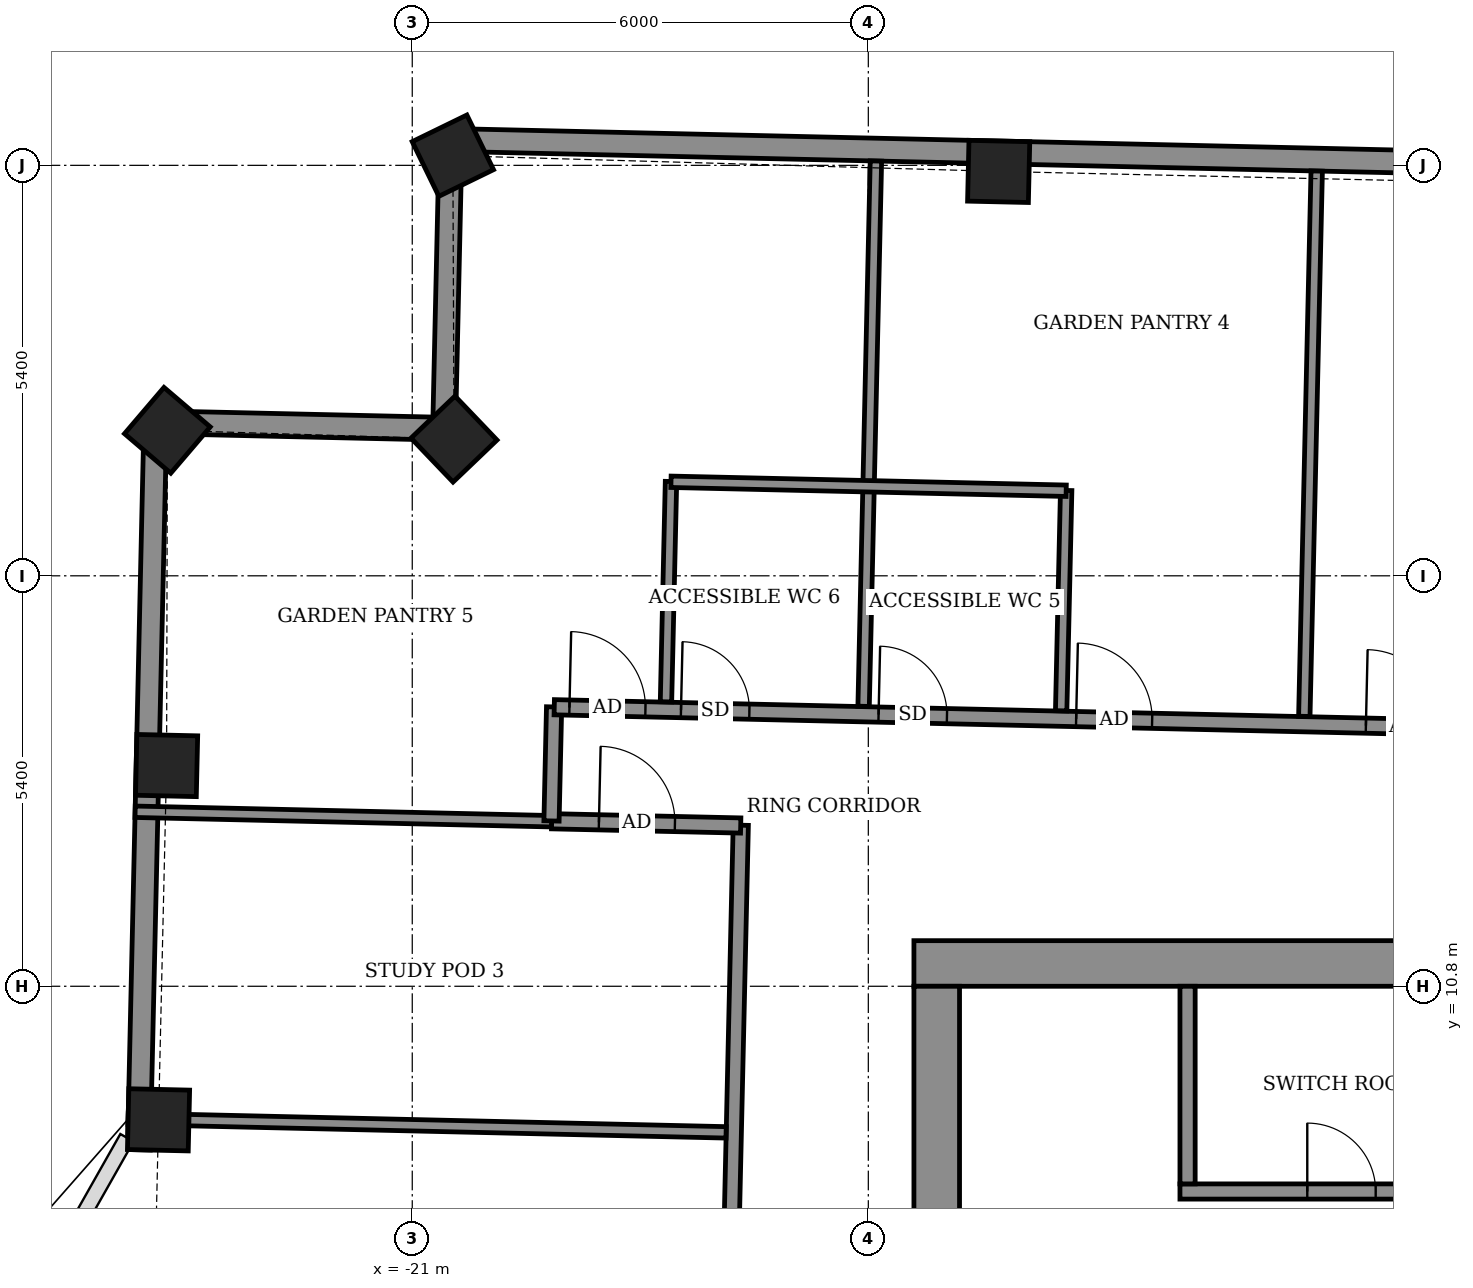
"""IFC4 building model, lengths in metres.
Left out: names, types, materials, properties, quantities, classifications, styles, units other than length and angle.
Written with IfcOpenShell. Run it as: python <this file> out.ifc"""

import sys

from ifc_helpers import new_model, si_unit, direction, frame, frame_2d, origin, origin_2d, place, context, subcontext, project, spatial, rectangle, extrude, element, fill, save


model = new_model("IFC4")
c1 = context("Model", 3, precision=1e-05, world=origin(), true_north=direction((0.0, 1.0)))
c2 = subcontext(c1, "Body", "Model", "MODEL_VIEW")
j1 = project(units=[si_unit("LENGTHUNIT", "METRE"), si_unit("PLANEANGLEUNIT", "RADIAN")], contexts=[c1])
p1 = place(None, origin())
s1 = spatial("IfcSite", under=j1, at=p1, CompositionType="ELEMENT")
p2 = place(p1, origin())
s2 = spatial("IfcBuilding", under=s1, at=p2, CompositionType="ELEMENT")
p3 = place(p2, frame((0.0, 0.0, 342.5)))
s3 = spatial("IfcBuildingStorey", under=s2, at=p3, CompositionType="ELEMENT", Elevation=342.5)
for number, where, z_axis, x_axis in (
    (1, (-13.285, 21.52, -0.55), (0.0, 0.0, 1.0), (-1.0, 0.023, 0.0)),
    (2, (-20.466, 21.728, -0.55), (0.0, 0.0, 1.0), (-0.899, -0.438, 0.0)),
    (3, (-20.451, 17.999, -0.55), (0.0, 0.0, 1.0), (-0.723, -0.691, 0.0)),
    (4, (-24.222, 18.114, -0.55), (0.0, 0.0, 1.0), (-0.649, -0.761, 0.0)),
    (5, (-24.232, 13.704, -0.55), (0.0, 0.0, 1.0), (-0.023, -1.0, 0.0)),
    (6, (-24.338, 9.043, -0.55), (0.0, 0.0, 1.0), (-0.023, -1.0, 0.0)),
):
    element("IfcColumn", number, at=place(p3, frame(where, z_axis=z_axis, x_axis=x_axis)), inside=s3, PredefinedType="COLUMN", context=c2, shape_type="SweptSolid", body=[
        extrude(rectangle(XDim=0.8, YDim=0.8, at=origin_2d()), origin(), (0.0, 0.0, 1.0), 3.6),
    ])
p4 = place(p3, frame((23.394, 20.938, 0.0), z_axis=(0.0, 0.0, 1.0), x_axis=(-0.99974255281, 0.02268982375, 0.0)))
e7 = element("IfcWall", 7, at=p4, inside=s3, PredefinedType="SOLIDWALL", context=c2, shape_type="SweptSolid", body=[
    extrude(rectangle(XDim=43.9, YDim=0.3, at=frame_2d((21.95, 0.0))), origin(), (0.0, 0.0, 1.0), 2.5),
])
p5 = place(p3, frame((-20.495, 21.934, 0.0), z_axis=(0.0, 0.0, 1.0), x_axis=(-0.022614868993, -0.999744251146, 0.0)))
e8 = element("IfcWall", 8, at=p5, inside=s3, PredefinedType="SOLIDWALL", context=c2, shape_type="SweptSolid", body=[
    extrude(rectangle(XDim=3.8, YDim=0.3, at=frame_2d((1.9, 0.0))), origin(), (0.0, 0.0, 1.0), 2.55),
])
p6 = place(p3, frame((-20.581, 18.135, 0.0), z_axis=(0.0, 0.0, 1.0), x_axis=(-0.999744218285, 0.022616321648, 0.0)))
e9 = element("IfcWall", 9, at=p6, inside=s3, PredefinedType="SOLIDWALL", context=c2, shape_type="SweptSolid", body=[
    extrude(rectangle(XDim=3.8, YDim=0.3, at=frame_2d((1.9, 0.0))), origin(), (0.0, 0.0, 1.0), 2.55),
])
p7 = place(p3, frame((-24.38, 18.221, 0.0), z_axis=(0.0, 0.0, 1.0), x_axis=(-0.022668695782, -0.9997430321, 0.0)))
e10 = element("IfcWall", 10, at=p7, inside=s3, PredefinedType="SOLIDWALL", context=c2, shape_type="SweptSolid", body=[
    extrude(rectangle(XDim=9.574, YDim=0.3, at=frame_2d((4.787, 0.0))), origin(), (0.0, 0.0, 1.0), 2.55),
])
p8 = place(p3, frame((-17.247, -12.149, 0.0), z_axis=(0.0, 0.0, 1.0), x_axis=(0.022696191528, 0.999742408268, 0.0)))
e11 = element("IfcWall", 11, at=p8, inside=s3, PredefinedType="PARTITIONING", context=c2, shape_type="SweptSolid", body=[
    extrude(rectangle(XDim=25.074, YDim=0.2, at=frame_2d((12.537, 0.0))), origin(), (0.0, 0.0, 1.0), 3.05),
])
p9 = place(p8, frame((18.022, 0.0, 0.0)))
e12 = element("IfcOpeningElement", 12, at=p9, cuts=e11, PredefinedType="OPENING", context=c2, shape_type="SweptSolid", body=[
    extrude(rectangle(XDim=1.0, YDim=2.1, at=frame_2d((0.5, 1.05))), frame((0.0, 0.11, 0.0), z_axis=(0.0, -1.0, 0.0), x_axis=(1.0, 0.0, 0.0)), (0.0, 0.0, 1.0), 0.22),
])
p10 = place(p8, frame((10.825, 0.0, 0.0)))
e13 = element("IfcOpeningElement", 13, at=p10, cuts=e11, PredefinedType="OPENING", context=c2, shape_type="SweptSolid", body=[
    extrude(rectangle(XDim=1.0, YDim=2.1, at=frame_2d((0.5, 1.05))), frame((0.0, 0.11, 0.0), z_axis=(0.0, -1.0, 0.0), x_axis=(1.0, 0.0, 0.0)), (0.0, 0.0, 1.0), 0.22),
])
p11 = place(p8, frame((6.075, 0.0, 0.0)))
e14 = element("IfcOpeningElement", 14, at=p11, cuts=e11, PredefinedType="OPENING", context=c2, shape_type="SweptSolid", body=[
    extrude(rectangle(XDim=1.0, YDim=2.1, at=frame_2d((0.5, 1.05))), frame((0.0, 0.11, 0.0), z_axis=(0.0, -1.0, 0.0), x_axis=(1.0, 0.0, 0.0)), (0.0, 0.0, 1.0), 0.22),
])
p12 = place(p8, frame((1.3, 0.0, 0.0)))
e15 = element("IfcOpeningElement", 15, at=p12, cuts=e11, PredefinedType="OPENING", context=c2, shape_type="SweptSolid", body=[
    extrude(rectangle(XDim=0.9, YDim=2.1, at=frame_2d((0.45, 1.05))), frame((0.0, 0.11, 0.0), z_axis=(0.0, -1.0, 0.0), x_axis=(1.0, 0.0, 0.0)), (0.0, 0.0, 1.0), 0.22),
])
p13 = place(p3, frame((-24.738, 9.057, 0.0), z_axis=(0.0, 0.0, 1.0), x_axis=(0.999741370831, -0.022741843553, 0.0)))
e16 = element("IfcWall", 16, at=p13, inside=s3, PredefinedType="PARTITIONING", context=c2, shape_type="SweptSolid", body=[
    extrude(rectangle(XDim=7.869, YDim=0.15, at=frame_2d((3.935, 0.0))), origin(), (0.0, 0.0, 1.0), 3.05),
])
p14 = place(p3, frame((-24.646, 13.096, 0.0), z_axis=(0.0, 0.0, 1.0), x_axis=(0.999740316781, -0.022788132944, 0.0)))
e17 = element("IfcWall", 17, at=p14, inside=s3, PredefinedType="PARTITIONING", context=c2, shape_type="SweptSolid", body=[
    extrude(rectangle(XDim=5.485, YDim=0.15, at=frame_2d((2.743, 0.0))), origin(), (0.0, 0.0, 1.0), 2.55),
])
p15 = place(p3, frame((-19.166, 12.971, 0.0), z_axis=(0.0, 0.0, 1.0), x_axis=(0.999747428818, -0.022473953195, 0.0)))
e18 = element("IfcWall", 18, at=p15, inside=s3, PredefinedType="PARTITIONING", context=c2, shape_type="SweptSolid", body=[
    extrude(rectangle(XDim=2.488, YDim=0.2, at=frame_2d((1.244, 0.0))), origin(), (0.0, 0.0, 1.0), 3.05),
])
p16 = place(p15, frame((0.622, 0.0, 0.0)))
e19 = element("IfcOpeningElement", 19, at=p16, cuts=e18, PredefinedType="OPENING", context=c2, shape_type="SweptSolid", body=[
    extrude(rectangle(XDim=1.0, YDim=2.1, at=frame_2d((0.5, 1.05))), frame((0.0, 0.11, 0.0), z_axis=(0.0, -1.0, 0.0), x_axis=(1.0, 0.0, 0.0)), (0.0, 0.0, 1.0), 0.22),
])
p17 = place(p3, frame((-19.168, 12.975, 0.0), z_axis=(0.0, 0.0, 1.0), x_axis=(0.022617910375, 0.999744182344, 0.0)))
e20 = element("IfcWall", 20, at=p17, inside=s3, PredefinedType="PARTITIONING", context=c2, shape_type="SweptSolid", body=[
    extrude(rectangle(XDim=1.5, YDim=0.2, at=frame_2d((0.75, 0.0))), origin(), (0.0, 0.0, 1.0), 3.05),
])
p18 = place(p3, frame((-19.132, 14.471, 0.0), z_axis=(0.0, 0.0, 1.0), x_axis=(0.999742846934, -0.022676860534, 0.0)))
e21 = element("IfcWall", 21, at=p18, inside=s3, PredefinedType="PARTITIONING", context=c2, shape_type="SweptSolid", body=[
    extrude(rectangle(XDim=40.836, YDim=0.2, at=frame_2d((20.418, 0.0))), origin(), (0.0, 0.0, 1.0), 3.05),
])
p19 = place(p18, frame((38.379, 0.0, 0.0)))
e22 = element("IfcOpeningElement", 22, at=p19, cuts=e21, PredefinedType="OPENING", context=c2, shape_type="SweptSolid", body=[
    extrude(rectangle(XDim=1.0, YDim=2.1, at=frame_2d((0.5, 1.05))), frame((0.0, 0.11, 0.0), z_axis=(0.0, -1.0, 0.0), x_axis=(1.0, 0.0, 0.0)), (0.0, 0.0, 1.0), 0.22),
])
p20 = place(p18, frame((35.768, 0.0, 0.0)))
e23 = element("IfcOpeningElement", 23, at=p20, cuts=e21, PredefinedType="OPENING", context=c2, shape_type="SweptSolid", body=[
    extrude(rectangle(XDim=0.9, YDim=2.1, at=frame_2d((0.45, 1.05))), frame((0.0, 0.11, 0.0), z_axis=(0.0, -1.0, 0.0), x_axis=(1.0, 0.0, 0.0)), (0.0, 0.0, 1.0), 0.22),
])
p21 = place(p18, frame((31.451, 0.0, 0.0)))
e24 = element("IfcOpeningElement", 24, at=p21, cuts=e21, PredefinedType="OPENING", context=c2, shape_type="SweptSolid", body=[
    extrude(rectangle(XDim=1.0, YDim=2.1, at=frame_2d((0.5, 1.05))), frame((0.0, 0.11, 0.0), z_axis=(0.0, -1.0, 0.0), x_axis=(1.0, 0.0, 0.0)), (0.0, 0.0, 1.0), 0.22),
])
p22 = place(p18, frame((28.868, 0.0, 0.0)))
e25 = element("IfcOpeningElement", 25, at=p22, cuts=e21, PredefinedType="OPENING", context=c2, shape_type="SweptSolid", body=[
    extrude(rectangle(XDim=0.9, YDim=2.1, at=frame_2d((0.45, 1.05))), frame((0.0, 0.11, 0.0), z_axis=(0.0, -1.0, 0.0), x_axis=(1.0, 0.0, 0.0)), (0.0, 0.0, 1.0), 0.22),
])
p23 = place(p18, frame((24.743, 0.0, 0.0)))
e26 = element("IfcOpeningElement", 26, at=p23, cuts=e21, PredefinedType="OPENING", context=c2, shape_type="SweptSolid", body=[
    extrude(rectangle(XDim=1.0, YDim=2.1, at=frame_2d((0.5, 1.05))), frame((0.0, 0.11, 0.0), z_axis=(0.0, -1.0, 0.0), x_axis=(1.0, 0.0, 0.0)), (0.0, 0.0, 1.0), 0.22),
])
p24 = place(p18, frame((19.119, 0.0, 0.0)))
e27 = element("IfcOpeningElement", 27, at=p24, cuts=e21, PredefinedType="OPENING", context=c2, shape_type="SweptSolid", body=[
    extrude(rectangle(XDim=1.0, YDim=2.1, at=frame_2d((0.5, 1.05))), frame((0.0, 0.11, 0.0), z_axis=(0.0, -1.0, 0.0), x_axis=(1.0, 0.0, 0.0)), (0.0, 0.0, 1.0), 0.22),
])
p25 = place(p18, frame((10.681, 0.0, 0.0)))
e28 = element("IfcOpeningElement", 28, at=p25, cuts=e21, PredefinedType="OPENING", context=c2, shape_type="SweptSolid", body=[
    extrude(rectangle(XDim=1.0, YDim=2.1, at=frame_2d((0.5, 1.05))), frame((0.0, 0.11, 0.0), z_axis=(0.0, -1.0, 0.0), x_axis=(1.0, 0.0, 0.0)), (0.0, 0.0, 1.0), 0.22),
])
p26 = place(p18, frame((15.318, 0.0, 0.0)))
e29 = element("IfcOpeningElement", 29, at=p26, cuts=e21, PredefinedType="OPENING", context=c2, shape_type="SweptSolid", body=[
    extrude(rectangle(XDim=0.9, YDim=2.1, at=frame_2d((0.45, 1.05))), frame((0.0, 0.11, 0.0), z_axis=(0.0, -1.0, 0.0), x_axis=(1.0, 0.0, 0.0)), (0.0, 0.0, 1.0), 0.22),
])
p27 = place(p18, frame((6.868, 0.0, 0.0)))
e30 = element("IfcOpeningElement", 30, at=p27, cuts=e21, PredefinedType="OPENING", context=c2, shape_type="SweptSolid", body=[
    extrude(rectangle(XDim=1.0, YDim=2.1, at=frame_2d((0.5, 1.05))), frame((0.0, 0.11, 0.0), z_axis=(0.0, -1.0, 0.0), x_axis=(1.0, 0.0, 0.0)), (0.0, 0.0, 1.0), 0.22),
])
p28 = place(p18, frame((4.268, 0.0, 0.0)))
e31 = element("IfcOpeningElement", 31, at=p28, cuts=e21, PredefinedType="OPENING", context=c2, shape_type="SweptSolid", body=[
    extrude(rectangle(XDim=0.9, YDim=2.1, at=frame_2d((0.45, 1.05))), frame((0.0, 0.11, 0.0), z_axis=(0.0, -1.0, 0.0), x_axis=(1.0, 0.0, 0.0)), (0.0, 0.0, 1.0), 0.22),
])
p29 = place(p18, frame((0.2, 0.0, 0.0)))
e32 = element("IfcOpeningElement", 32, at=p29, cuts=e21, PredefinedType="OPENING", context=c2, shape_type="SweptSolid", body=[
    extrude(rectangle(XDim=1.0, YDim=2.1, at=frame_2d((0.5, 1.05))), frame((0.0, 0.11, 0.0), z_axis=(0.0, -1.0, 0.0), x_axis=(1.0, 0.0, 0.0)), (0.0, 0.0, 1.0), 0.22),
])
p30 = place(p18, frame((1.668, 0.0, 0.0)))
e33 = element("IfcOpeningElement", 33, at=p30, cuts=e21, PredefinedType="OPENING", context=c2, shape_type="SweptSolid", body=[
    extrude(rectangle(XDim=0.9, YDim=2.1, at=frame_2d((0.45, 1.05))), frame((0.0, 0.11, 0.0), z_axis=(0.0, -1.0, 0.0), x_axis=(1.0, 0.0, 0.0)), (0.0, 0.0, 1.0), 0.22),
])
p31 = place(p3, frame((-17.662, 14.542, 0.0), z_axis=(0.0, 0.0, 1.0), x_axis=(0.022817032779, 0.999739657619, 0.0)))
e34 = element("IfcWall", 34, at=p31, inside=s3, PredefinedType="PARTITIONING", context=c2, shape_type="SweptSolid", body=[
    extrude(rectangle(XDim=2.9, YDim=0.15, at=frame_2d((1.45, 0.0))), origin(), (0.0, 0.0, 1.0), 3.05),
])
p32 = place(p3, frame((-15.062, 14.483, 0.0), z_axis=(0.0, 0.0, 1.0), x_axis=(0.022590796125, 0.999744795401, 0.0)))
e35 = element("IfcWall", 35, at=p32, inside=s3, PredefinedType="PARTITIONING", context=c2, shape_type="SweptSolid", body=[
    extrude(rectangle(XDim=7.176, YDim=0.15, at=frame_2d((3.588, 0.0))), origin(), (0.0, 0.0, 1.0), 2.5),
])
p33 = place(p3, frame((-12.463, 14.424, 0.0), z_axis=(0.0, 0.0, 1.0), x_axis=(0.022732880677, 0.999741574676, 0.0)))
e36 = element("IfcWall", 36, at=p33, inside=s3, PredefinedType="PARTITIONING", context=c2, shape_type="SweptSolid", body=[
    extrude(rectangle(XDim=2.9, YDim=0.15, at=frame_2d((1.45, 0.0))), origin(), (0.0, 0.0, 1.0), 3.05),
])
p34 = place(p3, frame((-9.264, 14.351, 0.0), z_axis=(0.0, 0.0, 1.0), x_axis=(0.02269358242, 0.999742467497, 0.0)))
e37 = element("IfcWall", 37, at=p34, inside=s3, PredefinedType="PARTITIONING", context=c2, shape_type="SweptSolid", body=[
    extrude(rectangle(XDim=7.176, YDim=0.15, at=frame_2d((3.588, 0.0))), origin(), (0.0, 0.0, 1.0), 2.5),
])
p35 = place(p3, frame((-17.596, 17.437, 0.0), z_axis=(0.0, 0.0, 1.0), x_axis=(0.99974287669, -0.022675548694, 0.0)))
e38 = element("IfcWall", 38, at=p35, inside=s3, PredefinedType="PARTITIONING", context=c2, shape_type="SweptSolid", body=[
    extrude(rectangle(XDim=5.2, YDim=0.15, at=frame_2d((2.6, 0.0))), origin(), (0.0, 0.0, 1.0), 3.05),
])
p36 = place(p3, frame((-14.4, 11.1, 0.0), z_axis=(0.0, 0.0, 1.0), x_axis=(1.0, 0.0, 0.0)))
e39 = element("IfcWall", 39, at=p36, inside=s3, PredefinedType="SHEAR", context=c2, shape_type="SweptSolid", body=[
    extrude(rectangle(XDim=28.8, YDim=0.6, at=frame_2d((14.4, 0.0))), origin(), (0.0, 0.0, 1.0), 3.6),
])
p37 = place(p3, frame((-14.1, -10.8, 0.0), z_axis=(0.0, 0.0, 1.0), x_axis=(0.0, 1.0, 0.0)))
e40 = element("IfcWall", 40, at=p37, inside=s3, PredefinedType="SHEAR", context=c2, shape_type="SweptSolid", body=[
    extrude(rectangle(XDim=21.6, YDim=0.6, at=frame_2d((10.8, 0.0))), origin(), (0.0, 0.0, 1.0), 3.6),
])
p38 = place(p37, frame((8.25, 0.0, 0.0)))
e41 = element("IfcOpeningElement", 41, at=p38, cuts=e40, PredefinedType="OPENING", context=c2, shape_type="SweptSolid", body=[
    extrude(rectangle(XDim=1.2, YDim=2.1, at=frame_2d((0.6, 1.05))), frame((0.0, 0.31, 0.0), z_axis=(0.0, -1.0, 0.0), x_axis=(1.0, 0.0, 0.0)), (0.0, 0.0, 1.0), 0.62),
])
p39 = place(p37, frame((15.25, 0.0, 0.0)))
e42 = element("IfcOpeningElement", 42, at=p39, cuts=e40, PredefinedType="OPENING", context=c2, shape_type="SweptSolid", body=[
    extrude(rectangle(XDim=1.2, YDim=2.1, at=frame_2d((0.6, 1.05))), frame((0.0, 0.31, 0.0), z_axis=(0.0, -1.0, 0.0), x_axis=(1.0, 0.0, 0.0)), (0.0, 0.0, 1.0), 0.62),
])
p40 = place(p3, frame((-10.9, 8.1, 0.0), z_axis=(0.0, 0.0, 1.0), x_axis=(1.0, 0.0, 0.0)))
e43 = element("IfcWall", 43, at=p40, inside=s3, PredefinedType="SHEAR", context=c2, shape_type="SweptSolid", body=[
    extrude(rectangle(XDim=21.8, YDim=0.2, at=frame_2d((10.9, 0.0))), origin(), (0.0, 0.0, 1.0), 3.05),
])
p41 = place(p40, frame((4.95, 0.0, 0.0)))
e44 = element("IfcOpeningElement", 44, at=p41, cuts=e43, PredefinedType="OPENING", context=c2, shape_type="SweptSolid", body=[
    extrude(rectangle(XDim=1.1, YDim=2.1, at=frame_2d((0.55, 1.05))), frame((0.0, 0.11, 0.0), z_axis=(0.0, -1.0, 0.0), x_axis=(1.0, 0.0, 0.0)), (0.0, 0.0, 1.0), 0.22),
])
p42 = place(p40, frame((7.65, 0.0, 0.0)))
e45 = element("IfcOpeningElement", 45, at=p42, cuts=e43, PredefinedType="OPENING", context=c2, shape_type="SweptSolid", body=[
    extrude(rectangle(XDim=1.1, YDim=2.1, at=frame_2d((0.55, 1.05))), frame((0.0, 0.11, 0.0), z_axis=(0.0, -1.0, 0.0), x_axis=(1.0, 0.0, 0.0)), (0.0, 0.0, 1.0), 0.22),
])
p43 = place(p40, frame((10.35, 0.0, 0.0)))
e46 = element("IfcOpeningElement", 46, at=p43, cuts=e43, PredefinedType="OPENING", context=c2, shape_type="SweptSolid", body=[
    extrude(rectangle(XDim=1.1, YDim=2.1, at=frame_2d((0.55, 1.05))), frame((0.0, 0.11, 0.0), z_axis=(0.0, -1.0, 0.0), x_axis=(1.0, 0.0, 0.0)), (0.0, 0.0, 1.0), 0.22),
])
p44 = place(p40, frame((1.675, 0.0, 0.0)))
e47 = element("IfcOpeningElement", 47, at=p44, cuts=e43, PredefinedType="OPENING", context=c2, shape_type="SweptSolid", body=[
    extrude(rectangle(XDim=0.9, YDim=2.1, at=frame_2d((0.45, 1.05))), frame((0.0, 0.11, 0.0), z_axis=(0.0, -1.0, 0.0), x_axis=(1.0, 0.0, 0.0)), (0.0, 0.0, 1.0), 0.22),
])
p45 = place(p40, frame((13.825, 0.0, 0.0)))
e48 = element("IfcOpeningElement", 48, at=p45, cuts=e43, PredefinedType="OPENING", context=c2, shape_type="SweptSolid", body=[
    extrude(rectangle(XDim=0.9, YDim=2.1, at=frame_2d((0.45, 1.05))), frame((0.0, 0.11, 0.0), z_axis=(0.0, -1.0, 0.0), x_axis=(1.0, 0.0, 0.0)), (0.0, 0.0, 1.0), 0.22),
])
p46 = place(p40, frame((18.55, 0.0, 0.0)))
e49 = element("IfcOpeningElement", 49, at=p46, cuts=e43, PredefinedType="OPENING", context=c2, shape_type="SweptSolid", body=[
    extrude(rectangle(XDim=0.9, YDim=2.1, at=frame_2d((0.45, 1.05))), frame((0.0, 0.11, 0.0), z_axis=(0.0, -1.0, 0.0), x_axis=(1.0, 0.0, 0.0)), (0.0, 0.0, 1.0), 0.22),
])
p47 = place(p3, frame((-10.8, 8.2, 0.0), z_axis=(0.0, 0.0, 1.0), x_axis=(0.0, 1.0, 0.0)))
e50 = element("IfcWall", 50, at=p47, inside=s3, PredefinedType="STANDARD", context=c2, shape_type="SweptSolid", body=[
    extrude(rectangle(XDim=2.6, YDim=0.2, at=frame_2d((1.3, 0.0))), origin(), (0.0, 0.0, 1.0), 3.05),
])
p48 = place(p25, origin())
e51 = element("IfcDoor", 51, at=p48, inside=s3, OperationType="SINGLE_SWING_RIGHT", PredefinedType="DOOR", context=c2, shape_type="SweptSolid", body=[
    extrude(rectangle(XDim=1.0, YDim=2.1, at=frame_2d((0.5, 1.05))), frame((0.0, 0.025, 0.0), z_axis=(0.0, -1.0, 0.0), x_axis=(1.0, 0.0, 0.0)), (0.0, 0.0, 1.0), 0.05),
])
fill(e28, e51)
p49 = place(p27, origin())
e52 = element("IfcDoor", 52, at=p49, inside=s3, OperationType="SINGLE_SWING_LEFT", PredefinedType="DOOR", context=c2, shape_type="SweptSolid", body=[
    extrude(rectangle(XDim=1.0, YDim=2.1, at=frame_2d((0.5, 1.05))), frame((0.0, 0.025, 0.0), z_axis=(0.0, -1.0, 0.0), x_axis=(1.0, 0.0, 0.0)), (0.0, 0.0, 1.0), 0.05),
])
fill(e30, e52)
p50 = place(p28, origin())
e53 = element("IfcDoor", 53, at=p50, inside=s3, OperationType="SINGLE_SWING_LEFT", PredefinedType="DOOR", context=c2, shape_type="SweptSolid", body=[
    extrude(rectangle(XDim=0.9, YDim=2.1, at=frame_2d((0.45, 1.05))), frame((0.0, 0.025, 0.0), z_axis=(0.0, -1.0, 0.0), x_axis=(1.0, 0.0, 0.0)), (0.0, 0.0, 1.0), 0.05),
])
fill(e31, e53)
p51 = place(p29, origin())
e54 = element("IfcDoor", 54, at=p51, inside=s3, OperationType="SINGLE_SWING_RIGHT", PredefinedType="DOOR", context=c2, shape_type="SweptSolid", body=[
    extrude(rectangle(XDim=1.0, YDim=2.1, at=frame_2d((0.5, 1.05))), frame((0.0, 0.025, 0.0), z_axis=(0.0, -1.0, 0.0), x_axis=(1.0, 0.0, 0.0)), (0.0, 0.0, 1.0), 0.05),
])
fill(e32, e54)
p52 = place(p30, origin())
e55 = element("IfcDoor", 55, at=p52, inside=s3, OperationType="SINGLE_SWING_RIGHT", PredefinedType="DOOR", context=c2, shape_type="SweptSolid", body=[
    extrude(rectangle(XDim=0.9, YDim=2.1, at=frame_2d((0.45, 1.05))), frame((0.0, 0.025, 0.0), z_axis=(0.0, -1.0, 0.0), x_axis=(1.0, 0.0, 0.0)), (0.0, 0.0, 1.0), 0.05),
])
fill(e33, e55)
p53 = place(p16, origin())
e56 = element("IfcDoor", 56, at=p53, inside=s3, OperationType="SINGLE_SWING_LEFT", PredefinedType="DOOR", context=c2, shape_type="SweptSolid", body=[
    extrude(rectangle(XDim=1.0, YDim=2.1, at=frame_2d((0.5, 1.05))), frame((0.0, 0.025, 0.0), z_axis=(0.0, -1.0, 0.0), x_axis=(1.0, 0.0, 0.0)), (0.0, 0.0, 1.0), 0.05),
])
fill(e19, e56)
p54 = place(p44, origin())
e57 = element("IfcDoor", 57, at=p54, inside=s3, OperationType="SINGLE_SWING_LEFT", PredefinedType="DOOR", context=c2, shape_type="SweptSolid", body=[
    extrude(rectangle(XDim=0.9, YDim=2.1, at=frame_2d((0.45, 1.05))), frame((0.0, 0.025, 0.0), z_axis=(0.0, -1.0, 0.0), x_axis=(1.0, 0.0, 0.0)), (0.0, 0.0, 1.0), 0.05),
])
fill(e47, e57)
save(model, sys.argv[1])
